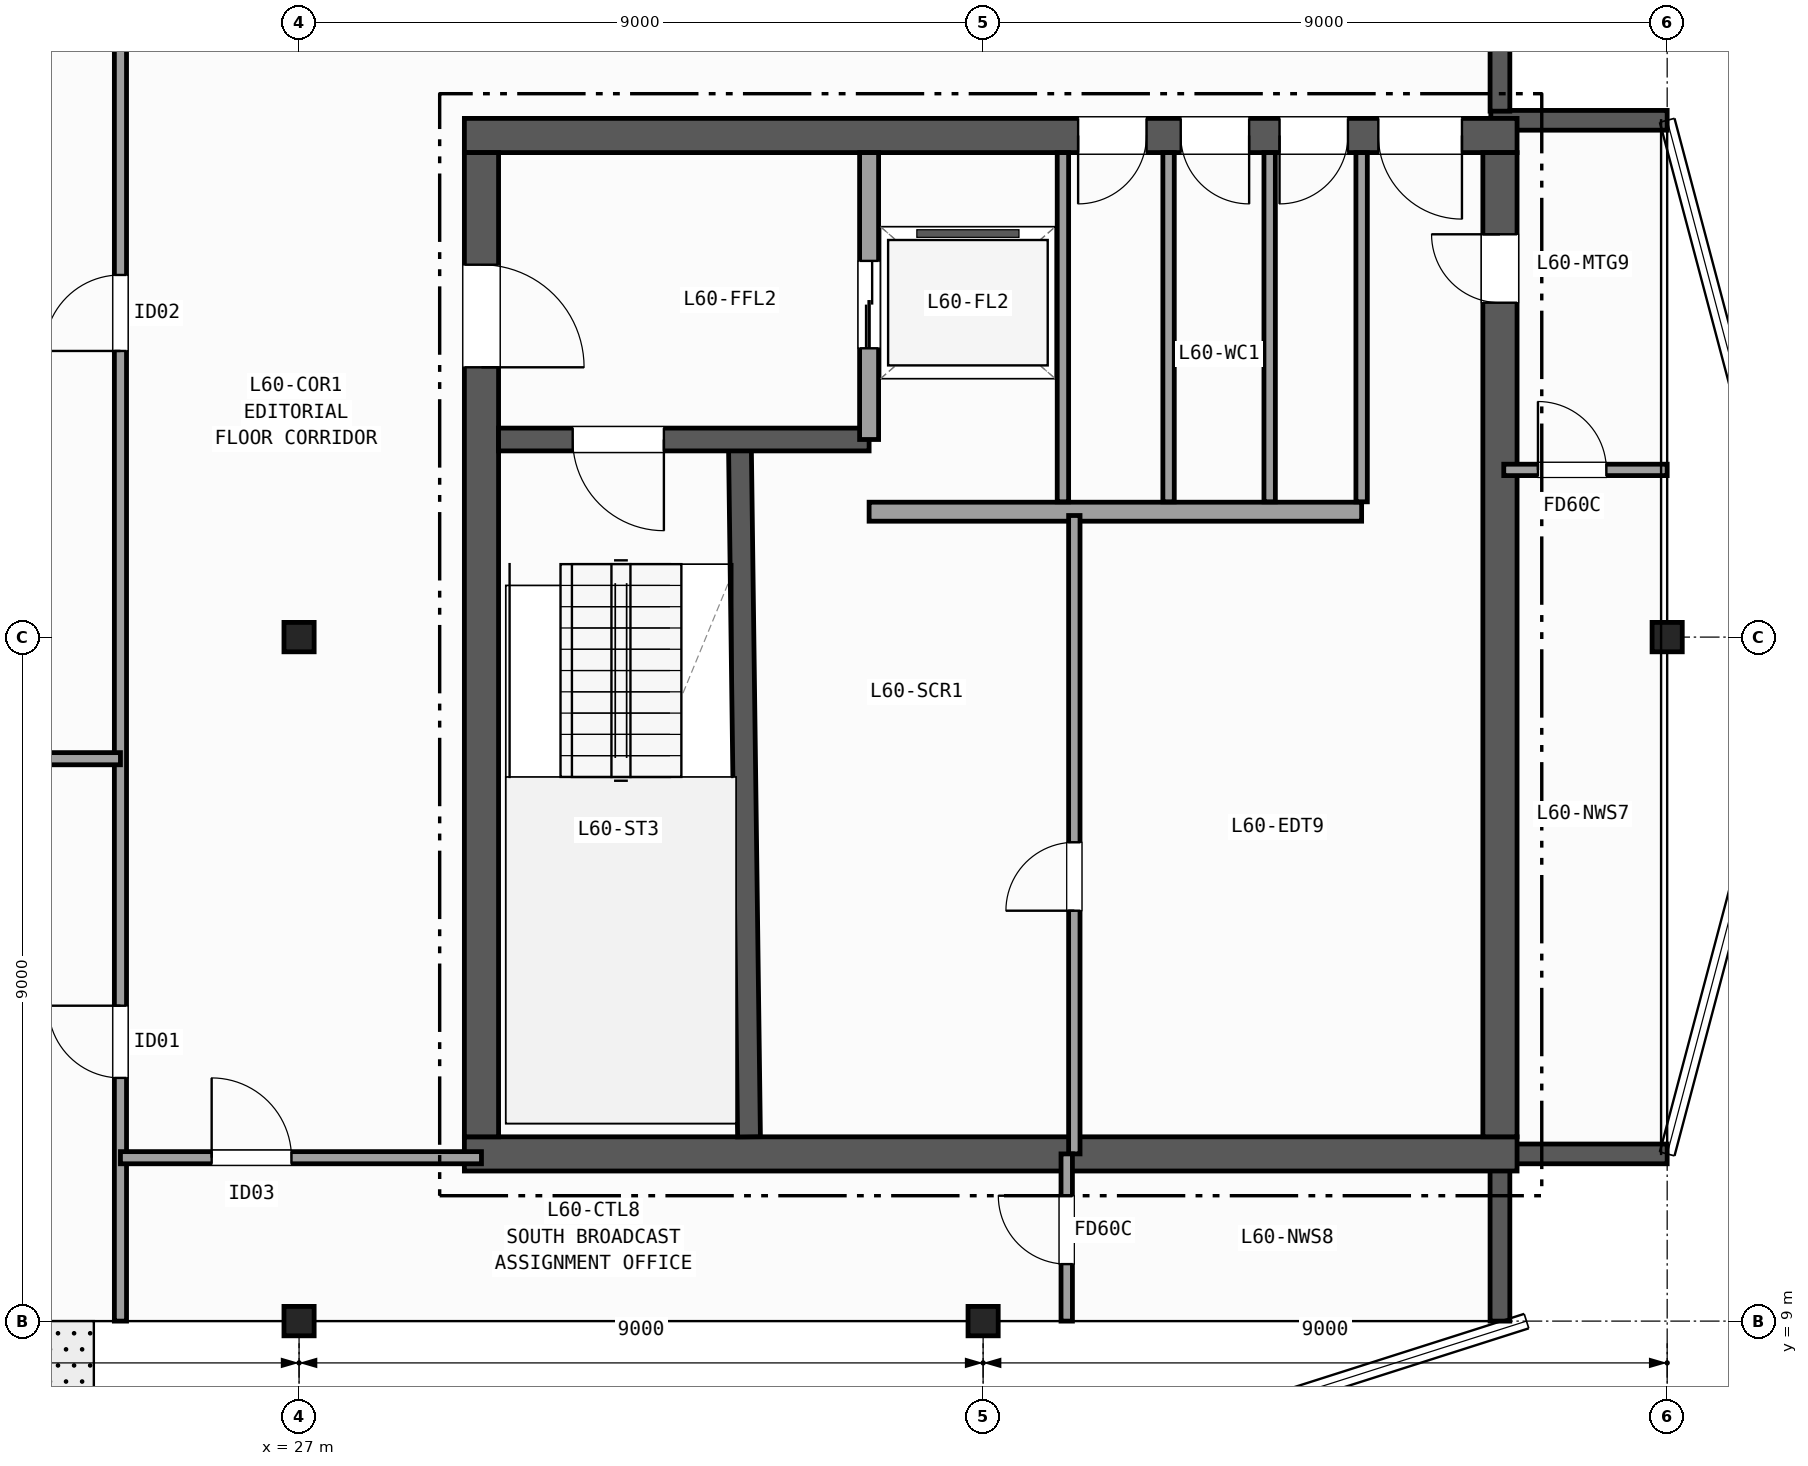
"""IFC4 building model, lengths in metres.
Left out: names, types, materials, properties, quantities, classifications, styles, units other than length and angle.
Written with IfcOpenShell. Run it as: python <this file> out.ifc"""

import sys

from ifc_helpers import new_model, si_unit, direction, frame, frame_2d, origin, origin_2d, place, context, subcontext, project, spatial, rectangle, i_section, extrude, element, fill, save


model = new_model("IFC4")
c1 = context("Model", 3, precision=1e-05, world=origin(), true_north=direction((0.0, 1.0)))
c2 = subcontext(c1, "Body", "Model", "MODEL_VIEW")
j1 = project(units=[si_unit("LENGTHUNIT", "METRE"), si_unit("PLANEANGLEUNIT", "RADIAN")], contexts=[c1])
p1 = place(None, origin())
s1 = spatial("IfcSite", under=j1, at=p1, CompositionType="ELEMENT")
p2 = place(p1, origin())
s2 = spatial("IfcBuilding", under=s1, at=p2, CompositionType="ELEMENT")
p3 = place(p2, frame((0.0, 0.0, 240.8)))
s3 = spatial("IfcBuildingStorey", under=s2, at=p3, CompositionType="ELEMENT", Elevation=240.8)
for number, where, z_axis, x_axis in (
    (1, (27.0, 9.0, 0.0), (0.0, 0.0, 1.0), (1.0, 0.0, 0.0)),
    (2, (27.0, 18.0, 0.0), (0.0, 0.0, 1.0), (1.0, 0.0, 0.0)),
    (3, (36.0, 9.0, 0.0), (0.0, 0.0, 1.0), (1.0, 0.0, 0.0)),
    (4, (45.0, 18.0, 0.0), (0.0, 0.0, 1.0), (1.0, 0.0, 0.0)),
):
    element("IfcColumn", number, at=place(p3, frame(where, z_axis=z_axis, x_axis=x_axis)), inside=s3, PredefinedType="COLUMN", context=c2, shape_type="SweptSolid", body=[
        extrude(i_section(OverallWidth=0.397, OverallDepth=0.387, WebThickness=0.021, FlangeThickness=0.033, FilletRadius=0.015, at=origin_2d()), origin(), (0.0, 0.0, 1.0), 3.7),
    ])
p4 = place(p3, frame((42.8, 9.0, 0.0), z_axis=(0.0, 0.0, 1.0), x_axis=(0.0, 1.0, 0.0)))
e5 = element("IfcWall", 5, at=p4, inside=s3, PredefinedType="SOLIDWALL", context=c2, shape_type="SweptSolid", body=[
    extrude(rectangle(XDim=2.08, YDim=0.26, at=frame_2d((1.04, 0.0))), origin(), (0.0, 0.0, 1.0), 3.42),
])
for number, where, z_axis, x_axis in (
    (6, (42.68, 11.2, 0.0), (0.0, 0.0, 1.0), (1.0, 0.0, 0.0)),
    (7, (45.0, 24.8, 0.0), (0.0, 0.0, 1.0), (-1.0, 0.0, 0.0)),
):
    element("IfcWall", number, at=place(p3, frame(where, z_axis=z_axis, x_axis=x_axis)), inside=s3, PredefinedType="SOLIDWALL", context=c2, shape_type="SweptSolid", body=[
        extrude(rectangle(XDim=2.32, YDim=0.26, at=frame_2d((1.16, 0.0))), origin(), (0.0, 0.0, 1.0), 3.42),
    ])
p5 = place(p3, frame((42.8, 24.92, 0.0), z_axis=(0.0, 0.0, 1.0), x_axis=(0.0, 1.0, 0.0)))
e8 = element("IfcWall", 8, at=p5, inside=s3, PredefinedType="SOLIDWALL", context=c2, shape_type="SweptSolid", body=[
    extrude(rectangle(XDim=2.08, YDim=0.26, at=frame_2d((1.04, 0.0))), origin(), (0.0, 0.0, 1.0), 3.42),
])
p6 = place(p3, frame((29.175, 11.2, 0.0), z_axis=(0.0, 0.0, 1.0), x_axis=(1.0, 0.0, 0.0)))
e9 = element("IfcWall", 9, at=p6, inside=s3, PredefinedType="SHEAR", context=c2, shape_type="SweptSolid", body=[
    extrude(rectangle(XDim=13.85, YDim=0.45, at=frame_2d((6.925, 0.0))), origin(), (0.0, 0.0, 1.0), 3.42),
])
p7 = place(p3, frame((43.025, 24.6, 0.0), z_axis=(0.0, 0.0, 1.0), x_axis=(-1.0, 0.0, 0.0)))
e10 = element("IfcWall", 10, at=p7, inside=s3, PredefinedType="SHEAR", context=c2, shape_type="SweptSolid", body=[
    extrude(rectangle(XDim=13.85, YDim=0.45, at=frame_2d((6.925, 0.0))), origin(), (0.0, 0.0, 1.0), 3.42),
])
p8 = place(p7, frame((0.725, 0.0, 0.0)))
e11 = element("IfcOpeningElement", 11, at=p8, cuts=e10, PredefinedType="OPENING", context=c2, shape_type="SweptSolid", body=[
    extrude(rectangle(XDim=1.1, YDim=2.15, at=frame_2d((0.55, 1.075))), frame((0.0, 0.235, 0.0), z_axis=(0.0, -1.0, 0.0), x_axis=(1.0, 0.0, 0.0)), (0.0, 0.0, 1.0), 0.47),
])
p9 = place(p7, frame((2.225, 0.0, 0.0)))
e12 = element("IfcOpeningElement", 12, at=p9, cuts=e10, PredefinedType="OPENING", context=c2, shape_type="SweptSolid", body=[
    extrude(rectangle(XDim=0.9, YDim=2.1, at=frame_2d((0.45, 1.05))), frame((0.0, 0.235, 0.0), z_axis=(0.0, -1.0, 0.0), x_axis=(1.0, 0.0, 0.0)), (0.0, 0.0, 1.0), 0.47),
])
p10 = place(p7, frame((3.525, 0.0, 0.0)))
e13 = element("IfcOpeningElement", 13, at=p10, cuts=e10, PredefinedType="OPENING", context=c2, shape_type="SweptSolid", body=[
    extrude(rectangle(XDim=0.9, YDim=2.1, at=frame_2d((0.45, 1.05))), frame((0.0, 0.235, 0.0), z_axis=(0.0, -1.0, 0.0), x_axis=(1.0, 0.0, 0.0)), (0.0, 0.0, 1.0), 0.47),
])
p11 = place(p7, frame((4.875, 0.0, 0.0)))
e14 = element("IfcOpeningElement", 14, at=p11, cuts=e10, PredefinedType="OPENING", context=c2, shape_type="SweptSolid", body=[
    extrude(rectangle(XDim=0.9, YDim=2.1, at=frame_2d((0.45, 1.05))), frame((0.0, 0.235, 0.0), z_axis=(0.0, -1.0, 0.0), x_axis=(1.0, 0.0, 0.0)), (0.0, 0.0, 1.0), 0.47),
])
p12 = place(p3, frame((29.4, 24.375, 0.0), z_axis=(0.0, 0.0, 1.0), x_axis=(0.0, -1.0, 0.0)))
e15 = element("IfcWall", 15, at=p12, inside=s3, PredefinedType="SHEAR", context=c2, shape_type="SweptSolid", body=[
    extrude(rectangle(XDim=12.95, YDim=0.45, at=frame_2d((6.475, 0.0))), origin(), (0.0, 0.0, 1.0), 3.42),
])
p13 = place(p12, frame((1.475, 0.0, 0.0)))
e16 = element("IfcOpeningElement", 16, at=p13, cuts=e15, PredefinedType="OPENING", context=c2, shape_type="SweptSolid", body=[
    extrude(rectangle(XDim=1.35, YDim=2.15, at=frame_2d((0.675, 1.075))), frame((0.0, 0.235, 0.0), z_axis=(0.0, -1.0, 0.0), x_axis=(1.0, 0.0, 0.0)), (0.0, 0.0, 1.0), 0.47),
])
p14 = place(p3, frame((42.8, 11.425, 0.0), z_axis=(0.0, 0.0, 1.0), x_axis=(0.0, 1.0, 0.0)))
e17 = element("IfcWall", 17, at=p14, inside=s3, PredefinedType="SHEAR", context=c2, shape_type="SweptSolid", body=[
    extrude(rectangle(XDim=12.95, YDim=0.45, at=frame_2d((6.475, 0.0))), origin(), (0.0, 0.0, 1.0), 3.42),
])
p15 = place(p14, frame((10.975, 0.0, 0.0)))
e18 = element("IfcOpeningElement", 18, at=p15, cuts=e17, PredefinedType="OPENING", context=c2, shape_type="SweptSolid", body=[
    extrude(rectangle(XDim=0.9, YDim=2.1, at=frame_2d((0.45, 1.05))), frame((0.0, 0.235, 0.0), z_axis=(0.0, -1.0, 0.0), x_axis=(1.0, 0.0, 0.0)), (0.0, 0.0, 1.0), 0.47),
])
p16 = place(p3, frame((32.92, 11.425, 0.0), z_axis=(0.0, 0.0, 1.0), x_axis=(-0.013135638869, 0.999913723774, 0.0)))
e19 = element("IfcWall", 19, at=p16, inside=s3, PredefinedType="SHEAR", context=c2, shape_type="SweptSolid", body=[
    extrude(rectangle(XDim=9.126, YDim=0.3, at=frame_2d((4.563, 0.0))), origin(), (0.0, 0.0, 1.0), 3.42),
])
p17 = place(p3, frame((34.5, 20.6, 0.0), z_axis=(0.0, 0.0, 1.0), x_axis=(-1.0, 0.0, 0.0)))
e20 = element("IfcWall", 20, at=p17, inside=s3, PredefinedType="SHEAR", context=c2, shape_type="SweptSolid", body=[
    extrude(rectangle(XDim=4.875, YDim=0.3, at=frame_2d((2.438, 0.0))), origin(), (0.0, 0.0, 1.0), 3.42),
])
p18 = place(p17, frame((2.7, 0.0, 0.0)))
e21 = element("IfcOpeningElement", 21, at=p18, cuts=e20, PredefinedType="OPENING", context=c2, shape_type="SweptSolid", body=[
    extrude(rectangle(XDim=1.2, YDim=2.15, at=frame_2d((0.6, 1.075))), frame((0.0, 0.16, 0.0), z_axis=(0.0, -1.0, 0.0), x_axis=(1.0, 0.0, 0.0)), (0.0, 0.0, 1.0), 0.32),
])
p19 = place(p3, frame((34.5, 20.6, 0.0), z_axis=(0.0, 0.0, 1.0), x_axis=(0.0, 1.0, 0.0)))
e22 = element("IfcWall", 22, at=p19, inside=s3, PredefinedType="PARTITIONING", context=c2, shape_type="SweptSolid", body=[
    extrude(rectangle(XDim=3.775, YDim=0.25, at=frame_2d((1.887, 0.0))), origin(), (0.0, 0.0, 1.0), 3.42),
])
p20 = place(p19, frame((1.2, 0.0, 0.0)))
e23 = element("IfcOpeningElement", 23, at=p20, cuts=e22, PredefinedType="OPENING", context=c2, shape_type="SweptSolid", body=[
    extrude(rectangle(XDim=1.15, YDim=2.15, at=frame_2d((0.575, 1.075))), frame((0.0, 0.135, 0.0), z_axis=(0.0, -1.0, 0.0), x_axis=(1.0, 0.0, 0.0)), (0.0, 0.0, 1.0), 0.27),
])
p21 = place(p3, frame((34.5, 19.65, 0.0), z_axis=(0.0, 0.0, 1.0), x_axis=(1.0, 0.0, 0.0)))
e24 = element("IfcWall", 24, at=p21, inside=s3, PredefinedType="PARTITIONING", context=c2, shape_type="SweptSolid", body=[
    extrude(rectangle(XDim=6.48, YDim=0.25, at=frame_2d((3.24, 0.0))), origin(), (0.0, 0.0, 1.0), 3.42),
])
p22 = place(p3, frame((37.2, 11.2, 0.0), z_axis=(0.0, 0.0, 1.0), x_axis=(0.0, 1.0, 0.0)))
e25 = element("IfcWall", 25, at=p22, inside=s3, PredefinedType="PARTITIONING", context=c2, shape_type="SweptSolid", body=[
    extrude(rectangle(XDim=8.4, YDim=0.15, at=frame_2d((4.2, 0.0))), origin(), (0.0, 0.0, 1.0), 3.42),
])
p23 = place(p22, frame((3.2, 0.0, 0.0)))
e26 = element("IfcOpeningElement", 26, at=p23, cuts=e25, PredefinedType="OPENING", context=c2, shape_type="SweptSolid", body=[
    extrude(rectangle(XDim=0.9, YDim=2.1, at=frame_2d((0.45, 1.05))), frame((0.0, 0.085, 0.0), z_axis=(0.0, -1.0, 0.0), x_axis=(1.0, 0.0, 0.0)), (0.0, 0.0, 1.0), 0.17),
])
for number, where, z_axis, x_axis in (
    (27, (37.05, 19.78, 0.0), (0.0, 0.0, 1.0), (0.0, 1.0, 0.0)),
    (28, (38.44, 19.78, 0.0), (0.0, 0.0, 1.0), (0.0, 1.0, 0.0)),
    (29, (39.77, 19.78, 0.0), (0.0, 0.0, 1.0), (0.0, 1.0, 0.0)),
    (30, (40.98, 19.78, 0.0), (0.0, 0.0, 1.0), (0.0, 1.0, 0.0)),
):
    element("IfcWall", number, at=place(p3, frame(where, z_axis=z_axis, x_axis=x_axis)), inside=s3, PredefinedType="PARTITIONING", context=c2, shape_type="SweptSolid", body=[
        extrude(rectangle(XDim=4.595, YDim=0.15, at=frame_2d((2.297, 0.0))), origin(), (0.0, 0.0, 1.0), 3.42),
    ])
p24 = place(p3, frame((24.65, 9.0, 0.0), z_axis=(0.0, 0.0, 1.0), x_axis=(0.0, 1.0, 0.0)))
e31 = element("IfcWall", 31, at=p24, inside=s3, PredefinedType="PARTITIONING", context=c2, shape_type="SweptSolid", body=[
    extrude(rectangle(XDim=19.2, YDim=0.16, at=frame_2d((9.6, 0.0))), origin(), (0.0, 0.0, 1.0), 2.707),
])
p25 = place(p24, frame((3.2, 0.0, 0.0)))
e32 = element("IfcOpeningElement", 32, at=p25, cuts=e31, PredefinedType="OPENING", context=c2, shape_type="SweptSolid", body=[
    extrude(rectangle(XDim=0.95, YDim=2.1, at=frame_2d((0.475, 1.05))), frame((0.0, 0.09, 0.0), z_axis=(0.0, -1.0, 0.0), x_axis=(1.0, 0.0, 0.0)), (0.0, 0.0, 1.0), 0.18),
])
p26 = place(p24, frame((12.765, 0.0, 0.0)))
e33 = element("IfcOpeningElement", 33, at=p26, cuts=e31, PredefinedType="OPENING", context=c2, shape_type="SweptSolid", body=[
    extrude(rectangle(XDim=1.0, YDim=2.1, at=frame_2d((0.5, 1.05))), frame((0.0, 0.09, 0.0), z_axis=(0.0, -1.0, 0.0), x_axis=(1.0, 0.0, 0.0)), (0.0, 0.0, 1.0), 0.18),
])
p27 = place(p3, frame((18.0, 16.4, 0.0), z_axis=(0.0, 0.0, 1.0), x_axis=(1.0, 0.0, 0.0)))
e34 = element("IfcWall", 34, at=p27, inside=s3, PredefinedType="PARTITIONING", context=c2, shape_type="SweptSolid", body=[
    extrude(rectangle(XDim=6.65, YDim=0.16, at=frame_2d((3.325, 0.0))), origin(), (0.0, 0.0, 1.0), 2.789),
])
p28 = place(p3, frame((24.65, 11.15, 0.0), z_axis=(0.0, 0.0, 1.0), x_axis=(1.0, 0.0, 0.0)))
e35 = element("IfcWall", 35, at=p28, inside=s3, PredefinedType="PARTITIONING", context=c2, shape_type="SweptSolid", body=[
    extrude(rectangle(XDim=4.75, YDim=0.16, at=frame_2d((2.375, 0.0))), origin(), (0.0, 0.0, 1.0), 2.792),
])
p29 = place(p28, frame((1.2, 0.0, 0.0)))
e36 = element("IfcOpeningElement", 36, at=p29, cuts=e35, PredefinedType="OPENING", context=c2, shape_type="SweptSolid", body=[
    extrude(rectangle(XDim=1.05, YDim=2.15, at=frame_2d((0.525, 1.075))), frame((0.0, 0.09, 0.0), z_axis=(0.0, -1.0, 0.0), x_axis=(1.0, 0.0, 0.0)), (0.0, 0.0, 1.0), 0.18),
])
p30 = place(p3, frame((37.1, 9.0, 0.0), z_axis=(0.0, 0.0, 1.0), x_axis=(0.0, 1.0, 0.0)))
e37 = element("IfcWall", 37, at=p30, inside=s3, PredefinedType="PARTITIONING", context=c2, shape_type="SweptSolid", body=[
    extrude(rectangle(XDim=2.2, YDim=0.15, at=frame_2d((1.1, 0.0))), origin(), (0.0, 0.0, 1.0), 3.42),
])
p31 = place(p30, frame((0.75, 0.0, 0.0)))
e38 = element("IfcOpeningElement", 38, at=p31, cuts=e37, PredefinedType="OPENING", context=c2, shape_type="SweptSolid", body=[
    extrude(rectangle(XDim=0.9, YDim=2.1, at=frame_2d((0.45, 1.05))), frame((0.0, 0.085, 0.0), z_axis=(0.0, -1.0, 0.0), x_axis=(1.0, 0.0, 0.0)), (0.0, 0.0, 1.0), 0.17),
])
p32 = place(p3, frame((42.85, 20.2, 0.0), z_axis=(0.0, 0.0, 1.0), x_axis=(1.0, 0.0, 0.0)))
e39 = element("IfcWall", 39, at=p32, inside=s3, PredefinedType="PARTITIONING", context=c2, shape_type="SweptSolid", body=[
    extrude(rectangle(XDim=2.15, YDim=0.15, at=frame_2d((1.075, 0.0))), origin(), (0.0, 0.0, 1.0), 3.42),
])
p33 = place(p32, frame((0.45, 0.0, 0.0)))
e40 = element("IfcOpeningElement", 40, at=p33, cuts=e39, PredefinedType="OPENING", context=c2, shape_type="SweptSolid", body=[
    extrude(rectangle(XDim=0.9, YDim=2.1, at=frame_2d((0.45, 1.05))), frame((0.0, 0.085, 0.0), z_axis=(0.0, -1.0, 0.0), x_axis=(1.0, 0.0, 0.0)), (0.0, 0.0, 1.0), 0.17),
])
p34 = place(p18, origin())
e41 = element("IfcDoor", 41, at=p34, inside=s3, OperationType="SINGLE_SWING_LEFT", PredefinedType="DOOR", context=c2, shape_type="SweptSolid", body=[
    extrude(rectangle(XDim=1.2, YDim=2.15, at=frame_2d((0.6, 1.075))), frame((0.0, 0.025, 0.0), z_axis=(0.0, -1.0, 0.0), x_axis=(1.0, 0.0, 0.0)), (0.0, 0.0, 1.0), 0.05),
])
fill(e21, e41)
p35 = place(p13, origin())
e42 = element("IfcDoor", 42, at=p35, inside=s3, OperationType="SINGLE_SWING_RIGHT", PredefinedType="DOOR", context=c2, shape_type="SweptSolid", body=[
    extrude(rectangle(XDim=1.35, YDim=2.15, at=frame_2d((0.675, 1.075))), frame((0.0, 0.025, 0.0), z_axis=(0.0, -1.0, 0.0), x_axis=(1.0, 0.0, 0.0)), (0.0, 0.0, 1.0), 0.05),
])
fill(e16, e42)
p36 = place(p15, origin())
e43 = element("IfcDoor", 43, at=p36, inside=s3, OperationType="SINGLE_SWING_RIGHT", PredefinedType="DOOR", context=c2, shape_type="SweptSolid", body=[
    extrude(rectangle(XDim=0.9, YDim=2.1, at=frame_2d((0.45, 1.05))), frame((0.0, 0.025, 0.0), z_axis=(0.0, -1.0, 0.0), x_axis=(1.0, 0.0, 0.0)), (0.0, 0.0, 1.0), 0.05),
])
fill(e18, e43)
p37 = place(p8, origin())
e44 = element("IfcDoor", 44, at=p37, inside=s3, OperationType="SINGLE_SWING_LEFT", PredefinedType="DOOR", context=c2, shape_type="SweptSolid", body=[
    extrude(rectangle(XDim=1.1, YDim=2.15, at=frame_2d((0.55, 1.075))), frame((0.0, 0.025, 0.0), z_axis=(0.0, -1.0, 0.0), x_axis=(1.0, 0.0, 0.0)), (0.0, 0.0, 1.0), 0.05),
])
fill(e11, e44)
p38 = place(p9, origin())
e45 = element("IfcDoor", 45, at=p38, inside=s3, OperationType="SINGLE_SWING_RIGHT", PredefinedType="DOOR", context=c2, shape_type="SweptSolid", body=[
    extrude(rectangle(XDim=0.9, YDim=2.1, at=frame_2d((0.45, 1.05))), frame((0.0, 0.025, 0.0), z_axis=(0.0, -1.0, 0.0), x_axis=(1.0, 0.0, 0.0)), (0.0, 0.0, 1.0), 0.05),
])
fill(e12, e45)
p39 = place(p10, origin())
e46 = element("IfcDoor", 46, at=p39, inside=s3, OperationType="SINGLE_SWING_LEFT", PredefinedType="DOOR", context=c2, shape_type="SweptSolid", body=[
    extrude(rectangle(XDim=0.9, YDim=2.1, at=frame_2d((0.45, 1.05))), frame((0.0, 0.025, 0.0), z_axis=(0.0, -1.0, 0.0), x_axis=(1.0, 0.0, 0.0)), (0.0, 0.0, 1.0), 0.05),
])
fill(e13, e46)
p40 = place(p11, origin())
e47 = element("IfcDoor", 47, at=p40, inside=s3, OperationType="SINGLE_SWING_RIGHT", PredefinedType="DOOR", context=c2, shape_type="SweptSolid", body=[
    extrude(rectangle(XDim=0.9, YDim=2.1, at=frame_2d((0.45, 1.05))), frame((0.0, 0.025, 0.0), z_axis=(0.0, -1.0, 0.0), x_axis=(1.0, 0.0, 0.0)), (0.0, 0.0, 1.0), 0.05),
])
fill(e14, e47)
p41 = place(p20, origin())
e48 = element("IfcDoor", 48, at=p41, inside=s3, OperationType="DOUBLE_DOOR_SLIDING", PredefinedType="DOOR", context=c2, shape_type="SweptSolid", body=[
    extrude(rectangle(XDim=1.15, YDim=2.15, at=frame_2d((0.575, 1.075))), frame((0.0, 0.025, 0.0), z_axis=(0.0, -1.0, 0.0), x_axis=(1.0, 0.0, 0.0)), (0.0, 0.0, 1.0), 0.05),
])
fill(e23, e48)
p42 = place(p23, origin())
e49 = element("IfcDoor", 49, at=p42, inside=s3, OperationType="SINGLE_SWING_LEFT", PredefinedType="DOOR", context=c2, shape_type="SweptSolid", body=[
    extrude(rectangle(XDim=0.9, YDim=2.1, at=frame_2d((0.45, 1.05))), frame((0.0, 0.025, 0.0), z_axis=(0.0, -1.0, 0.0), x_axis=(1.0, 0.0, 0.0)), (0.0, 0.0, 1.0), 0.05),
])
fill(e26, e49)
p43 = place(p25, origin())
e50 = element("IfcDoor", 50, at=p43, inside=s3, OperationType="SINGLE_SWING_RIGHT", PredefinedType="DOOR", context=c2, shape_type="SweptSolid", body=[
    extrude(rectangle(XDim=0.95, YDim=2.1, at=frame_2d((0.475, 1.05))), frame((0.0, 0.025, 0.0), z_axis=(0.0, -1.0, 0.0), x_axis=(1.0, 0.0, 0.0)), (0.0, 0.0, 1.0), 0.05),
])
fill(e32, e50)
p44 = place(p26, origin())
e51 = element("IfcDoor", 51, at=p44, inside=s3, OperationType="SINGLE_SWING_LEFT", PredefinedType="DOOR", context=c2, shape_type="SweptSolid", body=[
    extrude(rectangle(XDim=1.0, YDim=2.1, at=frame_2d((0.5, 1.05))), frame((0.0, 0.025, 0.0), z_axis=(0.0, -1.0, 0.0), x_axis=(1.0, 0.0, 0.0)), (0.0, 0.0, 1.0), 0.05),
])
fill(e33, e51)
p45 = place(p29, origin())
e52 = element("IfcDoor", 52, at=p45, inside=s3, OperationType="SINGLE_SWING_LEFT", PredefinedType="DOOR", context=c2, shape_type="SweptSolid", body=[
    extrude(rectangle(XDim=1.05, YDim=2.15, at=frame_2d((0.525, 1.075))), frame((0.0, 0.025, 0.0), z_axis=(0.0, -1.0, 0.0), x_axis=(1.0, 0.0, 0.0)), (0.0, 0.0, 1.0), 0.05),
])
fill(e36, e52)
p46 = place(p31, origin())
e53 = element("IfcDoor", 53, at=p46, inside=s3, OperationType="SINGLE_SWING_RIGHT", PredefinedType="DOOR", context=c2, shape_type="SweptSolid", body=[
    extrude(rectangle(XDim=0.9, YDim=2.1, at=frame_2d((0.45, 1.05))), frame((0.0, 0.025, 0.0), z_axis=(0.0, -1.0, 0.0), x_axis=(1.0, 0.0, 0.0)), (0.0, 0.0, 1.0), 0.05),
])
fill(e38, e53)
p47 = place(p33, origin())
e54 = element("IfcDoor", 54, at=p47, inside=s3, OperationType="SINGLE_SWING_LEFT", PredefinedType="DOOR", context=c2, shape_type="SweptSolid", body=[
    extrude(rectangle(XDim=0.9, YDim=2.1, at=frame_2d((0.45, 1.05))), frame((0.0, 0.025, 0.0), z_axis=(0.0, -1.0, 0.0), x_axis=(1.0, 0.0, 0.0)), (0.0, 0.0, 1.0), 0.05),
])
fill(e40, e54)
save(model, sys.argv[1])
